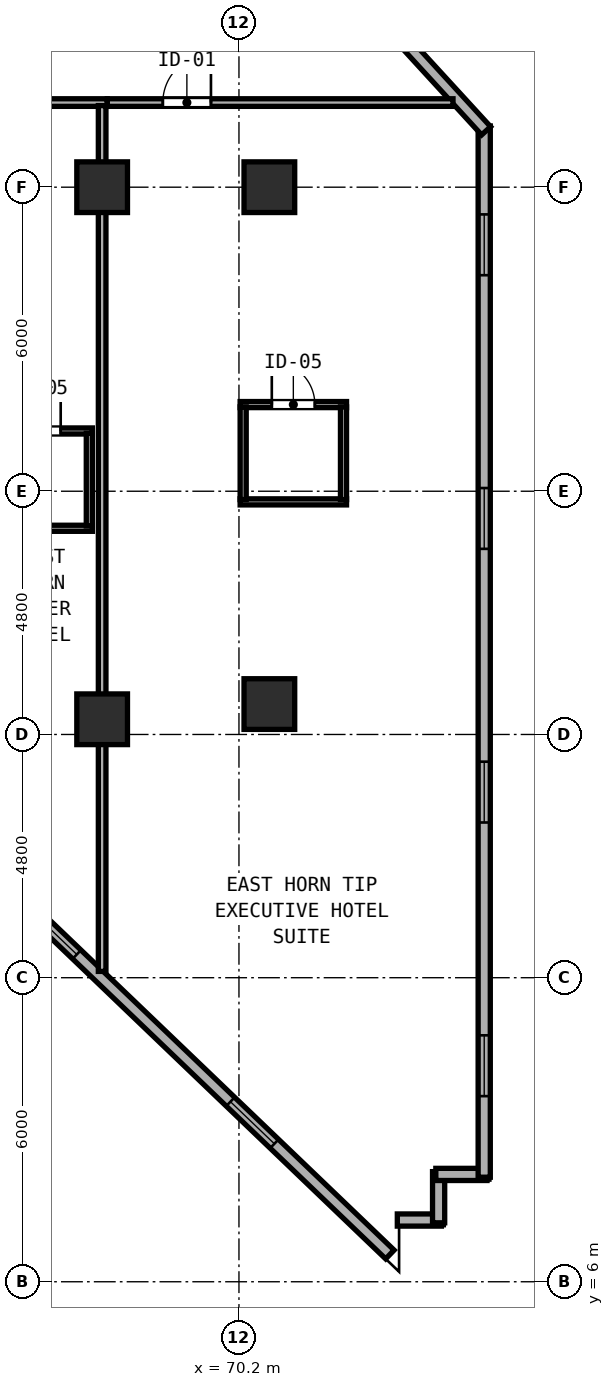
"""IFC4 building model, lengths in metres.
Left out: names, types, materials, properties, quantities, classifications, styles, units other than length and angle.
Written with IfcOpenShell. Run it as: python <this file> out.ifc"""

import sys

from ifc_helpers import new_model, si_unit, direction, frame, frame_2d, origin, origin_2d, place, context, subcontext, project, spatial, rectangle, hollow_rectangle, extrude, element, fill, save


model = new_model("IFC4")
c1 = context("Model", 3, precision=1e-05, world=origin(), true_north=direction((0.0, 1.0)))
c2 = subcontext(c1, "Body", "Model", "MODEL_VIEW")
j1 = project(units=[si_unit("LENGTHUNIT", "METRE"), si_unit("PLANEANGLEUNIT", "RADIAN")], contexts=[c1])
p1 = place(None, origin())
s1 = spatial("IfcSite", under=j1, at=p1, CompositionType="ELEMENT")
p2 = place(p1, origin())
s2 = spatial("IfcBuilding", under=s1, at=p2, CompositionType="ELEMENT")
p3 = place(p2, frame((0.0, 0.0, 55.2)))
s3 = spatial("IfcBuildingStorey", under=s2, at=p3, CompositionType="ELEMENT", Elevation=55.2)
for number, where, z_axis, x_axis in (
    (1, (70.8, 17.4, 0.0), (0.0, 0.0, 1.0), (1.0, 0.0, 0.0)),
    (2, (70.8, 27.6, 0.0), (0.0, 0.0, 1.0), (1.0, 0.0, 0.0)),
    (3, (67.5, 17.1, 0.0), (0.0, 0.0, 1.0), (1.0, 0.0, 0.0)),
    (4, (67.5, 27.6, 0.0), (0.0, 0.0, 1.0), (1.0, 0.0, 0.0)),
):
    element("IfcColumn", number, at=place(p3, frame(where, z_axis=z_axis, x_axis=x_axis)), inside=s3, PredefinedType="COLUMN", context=c2, shape_type="SweptSolid", body=[
        extrude(hollow_rectangle(XDim=1.0, YDim=1.0, WallThickness=0.038, at=origin_2d()), origin(), (0.0, 0.0, 1.0), 3.8),
    ])
p4 = place(p3, frame((64.978, 14.396, 0.0), z_axis=(0.0, 0.0, 1.0), x_axis=(0.722045918727, -0.691845135308, 0.0)))
e5 = element("IfcWall", 5, at=p4, inside=s3, PredefinedType="SOLIDWALL", context=c2, shape_type="SweptSolid", body=[
    extrude(rectangle(XDim=11.358, YDim=0.24, at=frame_2d((5.679, 0.0))), origin(), (0.0, 0.0, 1.0), 3.6),
])
p5 = place(p4, frame((1.6, 0.0, 0.85)))
e6 = element("IfcOpeningElement", 6, at=p5, cuts=e5, PredefinedType="OPENING", context=c2, shape_type="SweptSolid", body=[
    extrude(rectangle(XDim=1.2, YDim=1.85, at=frame_2d((0.6, 0.925))), frame((0.0, 0.13, 0.0), z_axis=(0.0, -1.0, 0.0), x_axis=(1.0, 0.0, 0.0)), (0.0, 0.0, 1.0), 0.26),
])
p6 = place(p4, frame((7.0, 0.0, 0.85)))
e7 = element("IfcOpeningElement", 7, at=p6, cuts=e5, PredefinedType="OPENING", context=c2, shape_type="SweptSolid", body=[
    extrude(rectangle(XDim=1.2, YDim=1.85, at=frame_2d((0.6, 0.925))), frame((0.0, 0.13, 0.0), z_axis=(0.0, -1.0, 0.0), x_axis=(1.0, 0.0, 0.0)), (0.0, 0.0, 1.0), 0.26),
])
p7 = place(p3, frame((73.325, 7.218, 0.0), z_axis=(0.0, 0.0, 1.0), x_axis=(1.0, 0.0, 0.0)))
e8 = element("IfcWall", 8, at=p7, inside=s3, PredefinedType="SOLIDWALL", context=c2, shape_type="SweptSolid", body=[
    extrude(rectangle(XDim=0.87, YDim=0.24, at=frame_2d((0.435, 0.0))), origin(), (0.0, 0.0, 1.0), 3.6),
])
for number, where, z_axis, x_axis in (
    (9, (74.14, 7.163, 0.0), (0.0, 0.0, 1.0), (0.0, 1.0, 0.0)),
    (10, (74.085, 8.118, 0.0), (0.0, 0.0, 1.0), (1.0, 0.0, 0.0)),
):
    element("IfcWall", number, at=place(p3, frame(where, z_axis=z_axis, x_axis=x_axis)), inside=s3, PredefinedType="SOLIDWALL", context=c2, shape_type="SweptSolid", body=[
        extrude(rectangle(XDim=1.01, YDim=0.24, at=frame_2d((0.505, 0.0))), origin(), (0.0, 0.0, 1.0), 3.6),
    ])
p8 = place(p3, frame((75.04, 8.063, 0.0), z_axis=(0.0, 0.0, 1.0), x_axis=(0.0, 1.0, 0.0)))
e11 = element("IfcWall", 11, at=p8, inside=s3, PredefinedType="SOLIDWALL", context=c2, shape_type="SweptSolid", body=[
    extrude(rectangle(XDim=20.745, YDim=0.24, at=frame_2d((10.373, 0.0))), origin(), (0.0, 0.0, 1.0), 3.6),
])
p9 = place(p8, frame((1.6, 0.0, 0.85)))
e12 = element("IfcOpeningElement", 12, at=p9, cuts=e11, PredefinedType="OPENING", context=c2, shape_type="SweptSolid", body=[
    extrude(rectangle(XDim=1.2, YDim=1.85, at=frame_2d((0.6, 0.925))), frame((0.0, 0.13, 0.0), z_axis=(0.0, -1.0, 0.0), x_axis=(1.0, 0.0, 0.0)), (0.0, 0.0, 1.0), 0.26),
])
p10 = place(p8, frame((7.0, 0.0, 0.85)))
e13 = element("IfcOpeningElement", 13, at=p10, cuts=e11, PredefinedType="OPENING", context=c2, shape_type="SweptSolid", body=[
    extrude(rectangle(XDim=1.2, YDim=1.85, at=frame_2d((0.6, 0.925))), frame((0.0, 0.13, 0.0), z_axis=(0.0, -1.0, 0.0), x_axis=(1.0, 0.0, 0.0)), (0.0, 0.0, 1.0), 0.26),
])
p11 = place(p8, frame((12.4, 0.0, 0.85)))
e14 = element("IfcOpeningElement", 14, at=p11, cuts=e11, PredefinedType="OPENING", context=c2, shape_type="SweptSolid", body=[
    extrude(rectangle(XDim=1.2, YDim=1.85, at=frame_2d((0.6, 0.925))), frame((0.0, 0.13, 0.0), z_axis=(0.0, -1.0, 0.0), x_axis=(1.0, 0.0, 0.0)), (0.0, 0.0, 1.0), 0.26),
])
p12 = place(p8, frame((17.8, 0.0, 0.85)))
e15 = element("IfcOpeningElement", 15, at=p12, cuts=e11, PredefinedType="OPENING", context=c2, shape_type="SweptSolid", body=[
    extrude(rectangle(XDim=1.2, YDim=1.85, at=frame_2d((0.6, 0.925))), frame((0.0, 0.13, 0.0), z_axis=(0.0, -1.0, 0.0), x_axis=(1.0, 0.0, 0.0)), (0.0, 0.0, 1.0), 0.26),
])
p13 = place(p3, frame((75.077, 28.713, 0.0), z_axis=(0.0, 0.0, 1.0), x_axis=(-0.675751546976, 0.737129464042, 0.0)))
e16 = element("IfcWall", 16, at=p13, inside=s3, PredefinedType="SOLIDWALL", context=c2, shape_type="SweptSolid", body=[
    extrude(rectangle(XDim=3.286, YDim=0.24, at=frame_2d((1.643, 0.0))), origin(), (0.0, 0.0, 1.0), 3.6),
])
p14 = place(p3, frame((65.102, 29.27, 0.0), z_axis=(0.0, 0.0, 1.0), x_axis=(1.0, 0.0, 0.0)))
e17 = element("IfcWall", 17, at=p14, inside=s3, PredefinedType="PARTITIONING", context=c2, shape_type="SweptSolid", body=[
    extrude(rectangle(XDim=2.498, YDim=0.15, at=frame_2d((1.249, 0.0))), origin(), (0.0, 0.0, 1.0), 3.6),
])
p15 = place(p14, frame((1.312, 0.0, 0.0), z_axis=(0.0, 0.0, 1.0), x_axis=(-1.0, 0.0, 0.0)))
e18 = element("IfcOpeningElement", 18, at=p15, cuts=e17, PredefinedType="OPENING", context=c2, shape_type="SweptSolid", body=[
    extrude(rectangle(XDim=0.95, YDim=2.15, at=frame_2d((0.475, 1.075))), frame((0.0, 0.085, 0.0), z_axis=(0.0, -1.0, 0.0), x_axis=(1.0, 0.0, 0.0)), (0.0, 0.0, 1.0), 0.17),
])
p16 = place(p3, frame((67.5, 12.125, 0.0), z_axis=(0.0, 0.0, 1.0), x_axis=(0.0, 1.0, 0.0)))
e19 = element("IfcWall", 19, at=p16, inside=s3, PredefinedType="PARTITIONING", context=c2, shape_type="SweptSolid", body=[
    extrude(rectangle(XDim=17.085, YDim=0.15, at=frame_2d((8.543, 0.0))), origin(), (0.0, 0.0, 1.0), 3.6),
])
p17 = place(p3, frame((65.207, 22.789, 0.0), z_axis=(0.0, 0.0, 1.0), x_axis=(1.0, 0.0, 0.0)))
e20 = element("IfcWall", 20, at=p17, inside=s3, PredefinedType="PARTITIONING", context=c2, shape_type="SweptSolid", body=[
    extrude(rectangle(XDim=2.1, YDim=0.12, at=frame_2d((1.05, 0.0))), origin(), (0.0, 0.0, 1.0), 3.6),
])
p18 = place(p17, frame((1.475, 0.0, 0.0), z_axis=(0.0, 0.0, 1.0), x_axis=(-1.0, 0.0, 0.0)))
e21 = element("IfcOpeningElement", 21, at=p18, cuts=e20, PredefinedType="OPENING", context=c2, shape_type="SweptSolid", body=[
    extrude(rectangle(XDim=0.85, YDim=2.1, at=frame_2d((0.425, 1.05))), frame((0.0, 0.07, 0.0), z_axis=(0.0, -1.0, 0.0), x_axis=(1.0, 0.0, 0.0)), (0.0, 0.0, 1.0), 0.14),
])
p19 = place(p3, frame((65.207, 20.869, 0.0), z_axis=(0.0, 0.0, 1.0), x_axis=(1.0, 0.0, 0.0)))
e22 = element("IfcWall", 22, at=p19, inside=s3, PredefinedType="PARTITIONING", context=c2, shape_type="SweptSolid", body=[
    extrude(rectangle(XDim=2.1, YDim=0.12, at=frame_2d((1.05, 0.0))), origin(), (0.0, 0.0, 1.0), 3.6),
])
p20 = place(p3, frame((67.247, 20.914, 0.0), z_axis=(0.0, 0.0, 1.0), x_axis=(0.0, 1.0, 0.0)))
e23 = element("IfcWall", 23, at=p20, inside=s3, PredefinedType="PARTITIONING", context=c2, shape_type="SweptSolid", body=[
    extrude(rectangle(XDim=1.83, YDim=0.12, at=frame_2d((0.915, 0.0))), origin(), (0.0, 0.0, 1.0), 3.6),
])
p21 = place(p3, frame((67.602, 29.27, 0.0), z_axis=(0.0, 0.0, 1.0), x_axis=(1.0, 0.0, 0.0)))
e24 = element("IfcWall", 24, at=p21, inside=s3, PredefinedType="PARTITIONING", context=c2, shape_type="SweptSolid", body=[
    extrude(rectangle(XDim=6.822, YDim=0.15, at=frame_2d((3.411, 0.0))), origin(), (0.0, 0.0, 1.0), 3.6),
])
p22 = place(p21, frame((2.045, 0.0, 0.0), z_axis=(0.0, 0.0, 1.0), x_axis=(-1.0, 0.0, 0.0)))
e25 = element("IfcOpeningElement", 25, at=p22, cuts=e24, PredefinedType="OPENING", context=c2, shape_type="SweptSolid", body=[
    extrude(rectangle(XDim=0.95, YDim=2.18, at=frame_2d((0.475, 1.09))), frame((0.0, 0.085, 0.0), z_axis=(0.0, -1.0, 0.0), x_axis=(1.0, 0.0, 0.0)), (0.0, 0.0, 1.0), 0.17),
])
p23 = place(p3, frame((70.223, 23.31, 0.0), z_axis=(0.0, 0.0, 1.0), x_axis=(1.0, 0.0, 0.0)))
e26 = element("IfcWall", 26, at=p23, inside=s3, PredefinedType="PARTITIONING", context=c2, shape_type="SweptSolid", body=[
    extrude(rectangle(XDim=2.1, YDim=0.12, at=frame_2d((1.05, 0.0))), origin(), (0.0, 0.0, 1.0), 3.6),
])
p24 = place(p23, frame((1.475, 0.0, 0.0), z_axis=(0.0, 0.0, 1.0), x_axis=(-1.0, 0.0, 0.0)))
e27 = element("IfcOpeningElement", 27, at=p24, cuts=e26, PredefinedType="OPENING", context=c2, shape_type="SweptSolid", body=[
    extrude(rectangle(XDim=0.85, YDim=2.1, at=frame_2d((0.425, 1.05))), frame((0.0, 0.07, 0.0), z_axis=(0.0, -1.0, 0.0), x_axis=(1.0, 0.0, 0.0)), (0.0, 0.0, 1.0), 0.14),
])
p25 = place(p3, frame((70.223, 21.39, 0.0), z_axis=(0.0, 0.0, 1.0), x_axis=(1.0, 0.0, 0.0)))
e28 = element("IfcWall", 28, at=p25, inside=s3, PredefinedType="PARTITIONING", context=c2, shape_type="SweptSolid", body=[
    extrude(rectangle(XDim=2.1, YDim=0.12, at=frame_2d((1.05, 0.0))), origin(), (0.0, 0.0, 1.0), 3.6),
])
for number, where, z_axis, x_axis in (
    (29, (70.283, 21.435, 0.0), (0.0, 0.0, 1.0), (0.0, 1.0, 0.0)),
    (30, (72.263, 21.435, 0.0), (0.0, 0.0, 1.0), (0.0, 1.0, 0.0)),
):
    element("IfcWall", number, at=place(p3, frame(where, z_axis=z_axis, x_axis=x_axis)), inside=s3, PredefinedType="PARTITIONING", context=c2, shape_type="SweptSolid", body=[
        extrude(rectangle(XDim=1.83, YDim=0.12, at=frame_2d((0.915, 0.0))), origin(), (0.0, 0.0, 1.0), 3.6),
    ])
p26 = place(p5, origin())
e31 = element("IfcWindow", 31, at=p26, inside=s3, PartitioningType="SINGLE_PANEL", PredefinedType="WINDOW", context=c2, shape_type="SweptSolid", body=[
    extrude(rectangle(XDim=1.2, YDim=1.85, at=frame_2d((0.6, 0.925))), frame((0.0, 0.03, 0.0), z_axis=(0.0, -1.0, 0.0), x_axis=(1.0, 0.0, 0.0)), (0.0, 0.0, 1.0), 0.06),
])
fill(e6, e31)
p27 = place(p6, origin())
e32 = element("IfcWindow", 32, at=p27, inside=s3, PartitioningType="SINGLE_PANEL", PredefinedType="WINDOW", context=c2, shape_type="SweptSolid", body=[
    extrude(rectangle(XDim=1.2, YDim=1.85, at=frame_2d((0.6, 0.925))), frame((0.0, 0.03, 0.0), z_axis=(0.0, -1.0, 0.0), x_axis=(1.0, 0.0, 0.0)), (0.0, 0.0, 1.0), 0.06),
])
fill(e7, e32)
p28 = place(p9, origin())
e33 = element("IfcWindow", 33, at=p28, inside=s3, PartitioningType="SINGLE_PANEL", PredefinedType="WINDOW", context=c2, shape_type="SweptSolid", body=[
    extrude(rectangle(XDim=1.2, YDim=1.85, at=frame_2d((0.6, 0.925))), frame((0.0, 0.03, 0.0), z_axis=(0.0, -1.0, 0.0), x_axis=(1.0, 0.0, 0.0)), (0.0, 0.0, 1.0), 0.06),
])
fill(e12, e33)
p29 = place(p10, origin())
e34 = element("IfcWindow", 34, at=p29, inside=s3, PartitioningType="SINGLE_PANEL", PredefinedType="WINDOW", context=c2, shape_type="SweptSolid", body=[
    extrude(rectangle(XDim=1.2, YDim=1.85, at=frame_2d((0.6, 0.925))), frame((0.0, 0.03, 0.0), z_axis=(0.0, -1.0, 0.0), x_axis=(1.0, 0.0, 0.0)), (0.0, 0.0, 1.0), 0.06),
])
fill(e13, e34)
p30 = place(p11, origin())
e35 = element("IfcWindow", 35, at=p30, inside=s3, PartitioningType="SINGLE_PANEL", PredefinedType="WINDOW", context=c2, shape_type="SweptSolid", body=[
    extrude(rectangle(XDim=1.2, YDim=1.85, at=frame_2d((0.6, 0.925))), frame((0.0, 0.03, 0.0), z_axis=(0.0, -1.0, 0.0), x_axis=(1.0, 0.0, 0.0)), (0.0, 0.0, 1.0), 0.06),
])
fill(e14, e35)
p31 = place(p12, origin())
e36 = element("IfcWindow", 36, at=p31, inside=s3, PartitioningType="SINGLE_PANEL", PredefinedType="WINDOW", context=c2, shape_type="SweptSolid", body=[
    extrude(rectangle(XDim=1.2, YDim=1.85, at=frame_2d((0.6, 0.925))), frame((0.0, 0.03, 0.0), z_axis=(0.0, -1.0, 0.0), x_axis=(1.0, 0.0, 0.0)), (0.0, 0.0, 1.0), 0.06),
])
fill(e15, e36)
p32 = place(p18, origin())
e37 = element("IfcDoor", 37, at=p32, inside=s3, OperationType="SINGLE_SWING_LEFT", PredefinedType="DOOR", context=c2, shape_type="SweptSolid", body=[
    extrude(rectangle(XDim=0.85, YDim=2.1, at=frame_2d((0.425, 1.05))), frame((0.0, 0.025, 0.0), z_axis=(0.0, -1.0, 0.0), x_axis=(1.0, 0.0, 0.0)), (0.0, 0.0, 1.0), 0.05),
])
fill(e21, e37)
p33 = place(p22, origin())
e38 = element("IfcDoor", 38, at=p33, inside=s3, OperationType="SINGLE_SWING_LEFT", PredefinedType="DOOR", context=c2, shape_type="SweptSolid", body=[
    extrude(rectangle(XDim=0.95, YDim=2.18, at=frame_2d((0.475, 1.09))), frame((0.0, 0.025, 0.0), z_axis=(0.0, -1.0, 0.0), x_axis=(1.0, 0.0, 0.0)), (0.0, 0.0, 1.0), 0.05),
])
fill(e25, e38)
p34 = place(p24, origin())
e39 = element("IfcDoor", 39, at=p34, inside=s3, OperationType="SINGLE_SWING_RIGHT", PredefinedType="DOOR", context=c2, shape_type="SweptSolid", body=[
    extrude(rectangle(XDim=0.85, YDim=2.1, at=frame_2d((0.425, 1.05))), frame((0.0, 0.025, 0.0), z_axis=(0.0, -1.0, 0.0), x_axis=(1.0, 0.0, 0.0)), (0.0, 0.0, 1.0), 0.05),
])
fill(e27, e39)
save(model, sys.argv[1])
